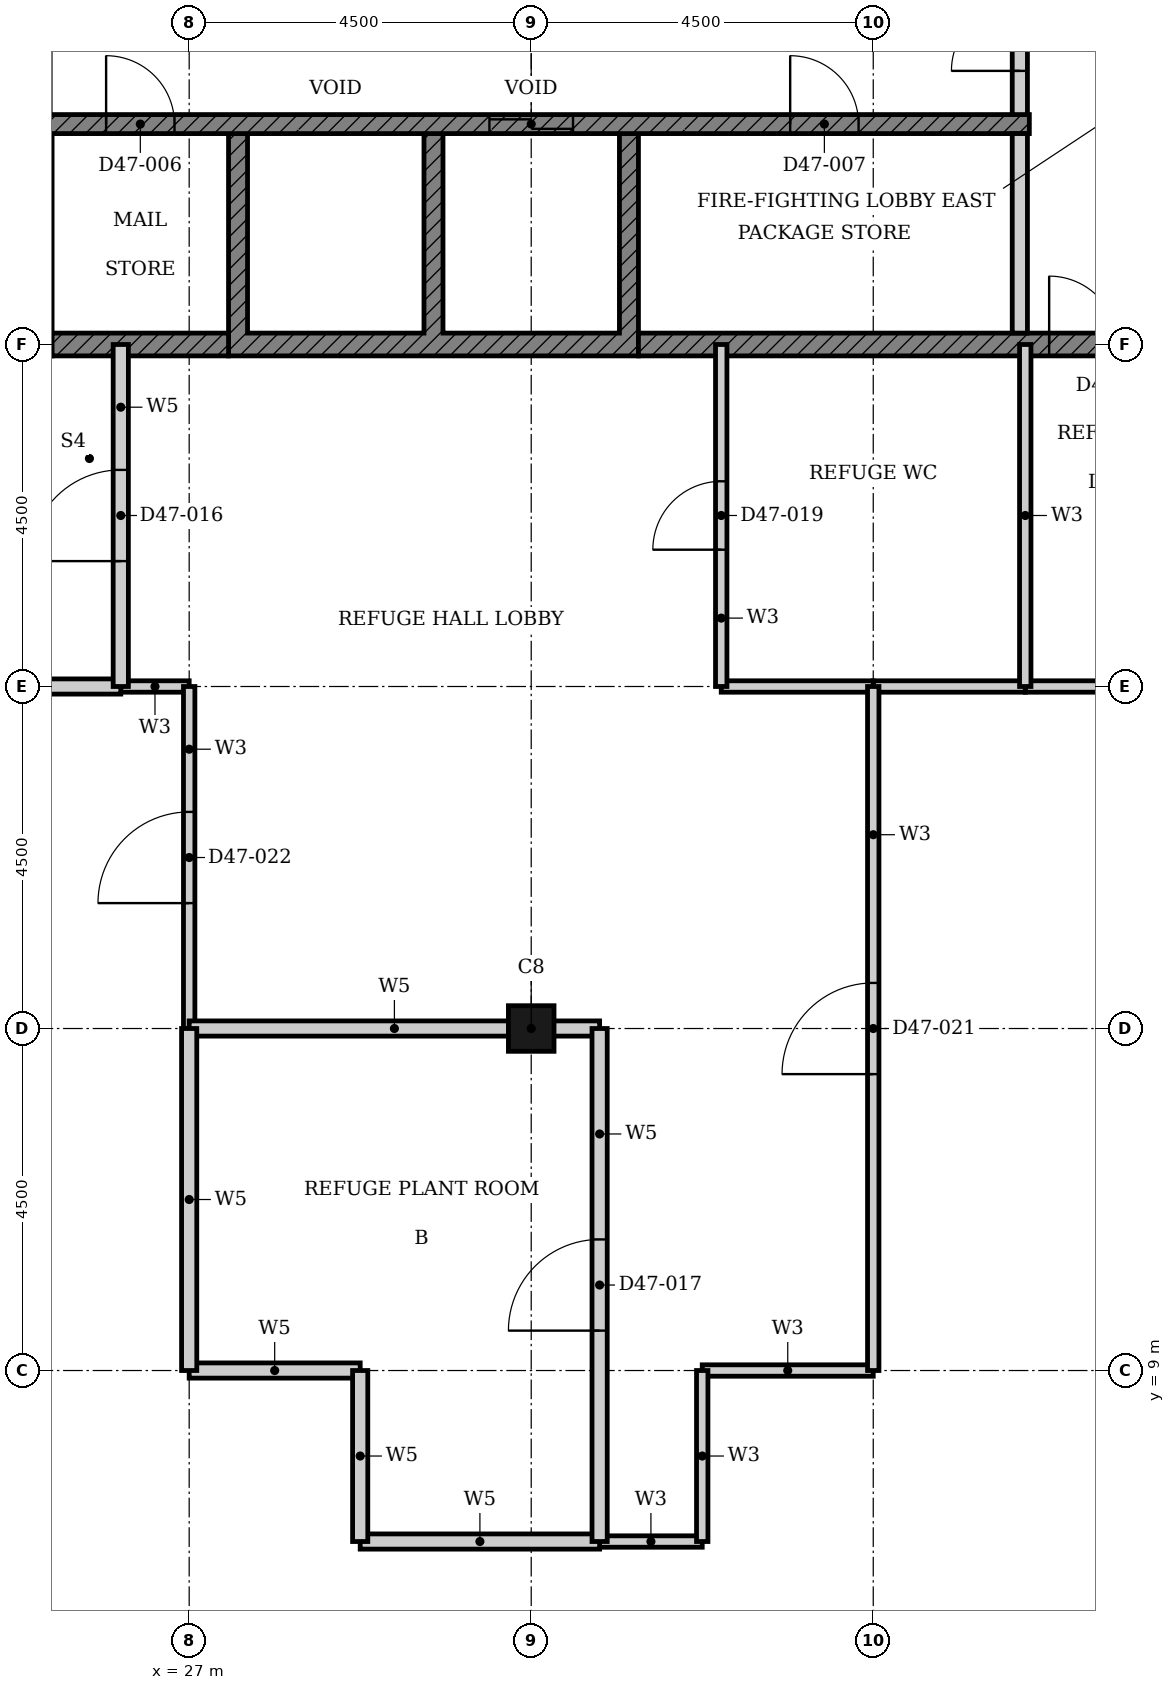
"""IFC4 building model, lengths in metres.
Left out: names, types, materials, properties, quantities, classifications, styles, units other than length and angle.
Written with IfcOpenShell. Run it as: python <this file> out.ifc"""

import sys

from ifc_helpers import new_model, si_unit, direction, frame, frame_2d, origin, origin_2d, place, context, subcontext, project, spatial, polyline, rectangle, hollow_rectangle, outline, extrude, element, fill, save


model = new_model("IFC4")
c1 = context("Model", 3, precision=1e-05, world=origin(), true_north=direction((0.0, 1.0)))
c2 = subcontext(c1, "Body", "Model", "MODEL_VIEW")
j1 = project(units=[si_unit("LENGTHUNIT", "METRE"), si_unit("PLANEANGLEUNIT", "RADIAN")], contexts=[c1])
p1 = place(None, origin())
s1 = spatial("IfcSite", under=j1, at=p1, CompositionType="ELEMENT")
p2 = place(p1, origin())
s2 = spatial("IfcBuilding", under=s1, at=p2, CompositionType="ELEMENT")
p3 = place(p2, frame((0.0, 0.0, 187.6)))
s3 = spatial("IfcBuildingStorey", under=s2, at=p3, CompositionType="ELEMENT", Elevation=187.6)
p4 = place(p3, frame((31.5, 13.5, 0.0), z_axis=(0.0, 0.0, 1.0), x_axis=(1.0, 0.0, 0.0)))
e1 = element("IfcColumn", 1, at=p4, inside=s3, PredefinedType="COLUMN", context=c2, shape_type="SweptSolid", body=[
    extrude(hollow_rectangle(XDim=0.6, YDim=0.6, WallThickness=0.02, at=origin_2d()), origin(), (0.0, 0.0, 1.0), 4.8),
])
p5 = place(p3, origin())
e2 = element("IfcWall", 2, at=p5, inside=s3, PredefinedType="SHEAR", context=c2, shape_type="SweptSolid", body=[
    extrude(outline(polyline([(27.518, 22.35), (32.911, 22.35), (32.911, 25.275), (32.661, 25.275), (32.661, 22.65), (30.339, 22.65), (30.339, 25.275), (30.089, 25.275), (30.089, 22.65), (27.768, 22.65), (27.768, 25.275), (27.518, 25.275), (27.518, 22.35)])), origin(), (0.0, 0.0, 1.0), 4.5),
])
p6 = place(p3, frame((25.197, 22.5, 0.0), z_axis=(0.0, 0.0, 1.0), x_axis=(1.0, 0.0, 0.0)))
e3 = element("IfcWall", 3, at=p6, inside=s3, PredefinedType="SHEAR", context=c2, shape_type="SweptSolid", body=[
    extrude(rectangle(XDim=2.321, YDim=0.3, at=frame_2d((1.161, 0.0))), origin(), (0.0, 0.0, 1.0), 4.5),
])
p7 = place(p3, frame((32.911, 22.5, 0.0), z_axis=(0.0, 0.0, 1.0), x_axis=(1.0, 0.0, 0.0)))
e4 = element("IfcWall", 4, at=p7, inside=s3, PredefinedType="SHEAR", context=c2, shape_type="SweptSolid", body=[
    extrude(rectangle(XDim=11.939, YDim=0.3, at=frame_2d((5.97, 0.0))), origin(), (0.0, 0.0, 1.0), 4.5),
])
p8 = place(p7, frame((5.404, 0.0, 0.0)))
e5 = element("IfcOpeningElement", 5, at=p8, cuts=e4, PredefinedType="OPENING", context=c2, shape_type="SweptSolid", body=[
    extrude(rectangle(XDim=1.8, YDim=2.1, at=frame_2d((0.9, 1.05))), frame((0.0, 0.16, 0.0), z_axis=(0.0, -1.0, 0.0), x_axis=(1.0, 0.0, 0.0)), (0.0, 0.0, 1.0), 0.32),
])
p9 = place(p3, frame((22.375, 25.4, 0.0), z_axis=(0.0, 0.0, 1.0), x_axis=(1.0, 0.0, 0.0)))
e6 = element("IfcWall", 6, at=p9, inside=s3, PredefinedType="SHEAR", context=c2, shape_type="SweptSolid", body=[
    extrude(rectangle(XDim=15.678, YDim=0.25, at=frame_2d((7.839, 0.0))), origin(), (0.0, 0.0, 1.0), 4.5),
])
p10 = place(p9, frame((8.575, 0.0, 0.0)))
e7 = element("IfcOpeningElement", 7, at=p10, cuts=e6, PredefinedType="OPENING", context=c2, shape_type="SweptSolid", body=[
    extrude(rectangle(XDim=1.1, YDim=2.1, at=frame_2d((0.55, 1.05))), frame((0.0, 0.135, 0.0), z_axis=(0.0, -1.0, 0.0), x_axis=(1.0, 0.0, 0.0)), (0.0, 0.0, 1.0), 0.27),
])
p11 = place(p9, frame((0.861, 0.0, 0.0)))
e8 = element("IfcOpeningElement", 8, at=p11, cuts=e6, PredefinedType="OPENING", context=c2, shape_type="SweptSolid", body=[
    extrude(rectangle(XDim=1.1, YDim=2.1, at=frame_2d((0.55, 1.05))), frame((0.0, 0.135, 0.0), z_axis=(0.0, -1.0, 0.0), x_axis=(1.0, 0.0, 0.0)), (0.0, 0.0, 1.0), 0.27),
])
p12 = place(p9, frame((3.532, 0.0, 0.0)))
e9 = element("IfcOpeningElement", 9, at=p12, cuts=e6, PredefinedType="OPENING", context=c2, shape_type="SweptSolid", body=[
    extrude(rectangle(XDim=0.9, YDim=2.1, at=frame_2d((0.45, 1.05))), frame((0.0, 0.135, 0.0), z_axis=(0.0, -1.0, 0.0), x_axis=(1.0, 0.0, 0.0)), (0.0, 0.0, 1.0), 0.27),
])
p13 = place(p9, frame((12.532, 0.0, 0.0)))
e10 = element("IfcOpeningElement", 10, at=p13, cuts=e6, PredefinedType="OPENING", context=c2, shape_type="SweptSolid", body=[
    extrude(rectangle(XDim=0.9, YDim=2.1, at=frame_2d((0.45, 1.05))), frame((0.0, 0.135, 0.0), z_axis=(0.0, -1.0, 0.0), x_axis=(1.0, 0.0, 0.0)), (0.0, 0.0, 1.0), 0.27),
])
p14 = place(p3, frame((37.928, 22.65, 0.0), z_axis=(0.0, 0.0, 1.0), x_axis=(0.0, 1.0, 0.0)))
e11 = element("IfcWall", 11, at=p14, inside=s3, PredefinedType="PARTITIONING", context=c2, shape_type="SweptSolid", body=[
    extrude(rectangle(XDim=2.625, YDim=0.2, at=frame_2d((1.312, 0.0))), origin(), (0.0, 0.0, 1.0), 4.5),
])
p15 = place(p3, frame((37.928, 25.525, 0.0), z_axis=(0.0, 0.0, 1.0), x_axis=(0.0, 1.0, 0.0)))
e12 = element("IfcWall", 12, at=p15, inside=s3, PredefinedType="PARTITIONING", context=c2, shape_type="SweptSolid", body=[
    extrude(rectangle(XDim=2.95, YDim=0.2, at=frame_2d((1.475, 0.0))), origin(), (0.0, 0.0, 1.0), 4.5),
])
p16 = place(p15, frame((0.575, 0.0, 0.0)))
e13 = element("IfcOpeningElement", 13, at=p16, cuts=e12, PredefinedType="OPENING", context=c2, shape_type="SweptSolid", body=[
    extrude(rectangle(XDim=1.8, YDim=2.1, at=frame_2d((0.9, 1.05))), frame((0.0, 0.11, 0.0), z_axis=(0.0, -1.0, 0.0), x_axis=(1.0, 0.0, 0.0)), (0.0, 0.0, 1.0), 0.22),
])
p17 = place(p3, frame((26.1, 18.0, 0.0), z_axis=(0.0, 0.0, 1.0), x_axis=(1.0, 0.0, 0.0)))
e14 = element("IfcWall", 14, at=p17, inside=s3, PredefinedType="PARTITIONING", context=c2, shape_type="SweptSolid", body=[
    extrude(rectangle(XDim=0.9, YDim=0.15, at=frame_2d((0.45, 0.0))), origin(), (0.0, 0.0, 1.0), 4.5),
])
p18 = place(p3, frame((38.0, 18.0, 0.0), z_axis=(0.0, 0.0, 1.0), x_axis=(1.0, 0.0, 0.0)))
e15 = element("IfcWall", 15, at=p18, inside=s3, PredefinedType="PARTITIONING", context=c2, shape_type="SweptSolid", body=[
    extrude(rectangle(XDim=2.5, YDim=0.15, at=frame_2d((1.25, 0.0))), origin(), (0.0, 0.0, 1.0), 4.5),
])
for number, where, z_axis, x_axis in (
    (16, (36.0, 18.0, 0.0), (0.0, 0.0, 1.0), (1.0, 0.0, 0.0)),
    (17, (34.0, 18.0, 0.0), (0.0, 0.0, 1.0), (1.0, 0.0, 0.0)),
):
    element("IfcWall", number, at=place(p3, frame(where, z_axis=z_axis, x_axis=x_axis)), inside=s3, PredefinedType="PARTITIONING", context=c2, shape_type="SweptSolid", body=[
        extrude(rectangle(XDim=2.0, YDim=0.15, at=frame_2d((1.0, 0.0))), origin(), (0.0, 0.0, 1.0), 4.5),
    ])
p19 = place(p3, frame((32.4, 6.75, 0.0), z_axis=(0.0, 0.0, 1.0), x_axis=(1.0, 0.0, 0.0)))
e18 = element("IfcWall", 18, at=p19, inside=s3, PredefinedType="PARTITIONING", context=c2, shape_type="SweptSolid", body=[
    extrude(rectangle(XDim=1.35, YDim=0.15, at=frame_2d((0.675, 0.0))), origin(), (0.0, 0.0, 1.0), 4.5),
])
p20 = place(p3, frame((33.75, 9.0, 0.0), z_axis=(0.0, 0.0, 1.0), x_axis=(1.0, 0.0, 0.0)))
e19 = element("IfcWall", 19, at=p20, inside=s3, PredefinedType="PARTITIONING", context=c2, shape_type="SweptSolid", body=[
    extrude(rectangle(XDim=2.25, YDim=0.15, at=frame_2d((1.125, 0.0))), origin(), (0.0, 0.0, 1.0), 4.5),
])
p21 = place(p3, frame((27.0, 13.5, 0.0), z_axis=(0.0, 0.0, 1.0), x_axis=(0.0, 1.0, 0.0)))
e20 = element("IfcWall", 20, at=p21, inside=s3, PredefinedType="PARTITIONING", context=c2, shape_type="SweptSolid", body=[
    extrude(rectangle(XDim=4.5, YDim=0.15, at=frame_2d((2.25, 0.0))), origin(), (0.0, 0.0, 1.0), 4.5),
])
p22 = place(p21, frame((1.65, 0.0, 0.0)))
e21 = element("IfcOpeningElement", 21, at=p22, cuts=e20, PredefinedType="OPENING", context=c2, shape_type="SweptSolid", body=[
    extrude(rectangle(XDim=1.2, YDim=2.1, at=frame_2d((0.6, 1.05))), frame((0.0, 0.085, 0.0), z_axis=(0.0, -1.0, 0.0), x_axis=(1.0, 0.0, 0.0)), (0.0, 0.0, 1.0), 0.17),
])
p23 = place(p3, frame((33.75, 6.75, 0.0), z_axis=(0.0, 0.0, 1.0), x_axis=(0.0, 1.0, 0.0)))
e22 = element("IfcWall", 22, at=p23, inside=s3, PredefinedType="PARTITIONING", context=c2, shape_type="SweptSolid", body=[
    extrude(rectangle(XDim=2.25, YDim=0.15, at=frame_2d((1.125, 0.0))), origin(), (0.0, 0.0, 1.0), 4.5),
])
p24 = place(p3, frame((34.0, 18.0, 0.0), z_axis=(0.0, 0.0, 1.0), x_axis=(0.0, 1.0, 0.0)))
e23 = element("IfcWall", 23, at=p24, inside=s3, PredefinedType="PARTITIONING", context=c2, shape_type="SweptSolid", body=[
    extrude(rectangle(XDim=4.5, YDim=0.15, at=frame_2d((2.25, 0.0))), origin(), (0.0, 0.0, 1.0), 4.5),
])
p25 = place(p24, frame((1.8, 0.0, 0.0)))
e24 = element("IfcOpeningElement", 24, at=p25, cuts=e23, PredefinedType="OPENING", context=c2, shape_type="SweptSolid", body=[
    extrude(rectangle(XDim=0.9, YDim=2.1, at=frame_2d((0.45, 1.05))), frame((0.0, 0.085, 0.0), z_axis=(0.0, -1.0, 0.0), x_axis=(1.0, 0.0, 0.0)), (0.0, 0.0, 1.0), 0.17),
])
p26 = place(p3, frame((36.0, 9.0, 0.0), z_axis=(0.0, 0.0, 1.0), x_axis=(0.0, 1.0, 0.0)))
e25 = element("IfcWall", 25, at=p26, inside=s3, PredefinedType="PARTITIONING", context=c2, shape_type="SweptSolid", body=[
    extrude(rectangle(XDim=9.0, YDim=0.15, at=frame_2d((4.5, 0.0))), origin(), (0.0, 0.0, 1.0), 3.78),
])
p27 = place(p26, frame((3.9, 0.0, 0.0)))
e26 = element("IfcOpeningElement", 26, at=p27, cuts=e25, PredefinedType="OPENING", context=c2, shape_type="SweptSolid", body=[
    extrude(rectangle(XDim=1.2, YDim=2.1, at=frame_2d((0.6, 1.05))), frame((0.0, 0.085, 0.0), z_axis=(0.0, -1.0, 0.0), x_axis=(1.0, 0.0, 0.0)), (0.0, 0.0, 1.0), 0.17),
])
p28 = place(p3, frame((38.0, 18.0, 0.0), z_axis=(0.0, 0.0, 1.0), x_axis=(0.0, 1.0, 0.0)))
e27 = element("IfcWall", 27, at=p28, inside=s3, PredefinedType="PARTITIONING", context=c2, shape_type="SweptSolid", body=[
    extrude(rectangle(XDim=4.5, YDim=0.15, at=frame_2d((2.25, 0.0))), origin(), (0.0, 0.0, 1.0), 4.5),
])
p29 = place(p3, frame((27.0, 13.5, 0.0), z_axis=(0.0, 0.0, 1.0), x_axis=(1.0, 0.0, 0.0)))
e28 = element("IfcWall", 28, at=p29, inside=s3, PredefinedType="PARTITIONING", context=c2, shape_type="SweptSolid", body=[
    extrude(rectangle(XDim=5.4, YDim=0.2, at=frame_2d((2.7, 0.0))), origin(), (0.0, 0.0, 1.0), 3.58),
])
p30 = place(p3, frame((22.5, 18.0, 0.0), z_axis=(0.0, 0.0, 1.0), x_axis=(1.0, 0.0, 0.0)))
e29 = element("IfcWall", 29, at=p30, inside=s3, PredefinedType="PARTITIONING", context=c2, shape_type="SweptSolid", body=[
    extrude(rectangle(XDim=3.6, YDim=0.2, at=frame_2d((1.8, 0.0))), origin(), (0.0, 0.0, 1.0), 4.5),
])
p31 = place(p3, frame((29.25, 6.75, 0.0), z_axis=(0.0, 0.0, 1.0), x_axis=(1.0, 0.0, 0.0)))
e30 = element("IfcWall", 30, at=p31, inside=s3, PredefinedType="PARTITIONING", context=c2, shape_type="SweptSolid", body=[
    extrude(rectangle(XDim=3.15, YDim=0.2, at=frame_2d((1.575, 0.0))), origin(), (0.0, 0.0, 1.0), 4.5),
])
p32 = place(p3, frame((27.0, 9.0, 0.0), z_axis=(0.0, 0.0, 1.0), x_axis=(1.0, 0.0, 0.0)))
e31 = element("IfcWall", 31, at=p32, inside=s3, PredefinedType="PARTITIONING", context=c2, shape_type="SweptSolid", body=[
    extrude(rectangle(XDim=2.25, YDim=0.2, at=frame_2d((1.125, 0.0))), origin(), (0.0, 0.0, 1.0), 4.5),
])
p33 = place(p3, frame((26.1, 18.0, 0.0), z_axis=(0.0, 0.0, 1.0), x_axis=(0.0, 1.0, 0.0)))
e32 = element("IfcWall", 32, at=p33, inside=s3, PredefinedType="PARTITIONING", context=c2, shape_type="SweptSolid", body=[
    extrude(rectangle(XDim=4.5, YDim=0.2, at=frame_2d((2.25, 0.0))), origin(), (0.0, 0.0, 1.0), 4.5),
])
p34 = place(p33, frame((1.65, 0.0, 0.0)))
e33 = element("IfcOpeningElement", 33, at=p34, cuts=e32, PredefinedType="OPENING", context=c2, shape_type="SweptSolid", body=[
    extrude(rectangle(XDim=1.2, YDim=2.1, at=frame_2d((0.6, 1.05))), frame((0.0, 0.11, 0.0), z_axis=(0.0, -1.0, 0.0), x_axis=(1.0, 0.0, 0.0)), (0.0, 0.0, 1.0), 0.22),
])
p35 = place(p3, frame((27.0, 9.0, 0.0), z_axis=(0.0, 0.0, 1.0), x_axis=(0.0, 1.0, 0.0)))
e34 = element("IfcWall", 34, at=p35, inside=s3, PredefinedType="PARTITIONING", context=c2, shape_type="SweptSolid", body=[
    extrude(rectangle(XDim=4.5, YDim=0.2, at=frame_2d((2.25, 0.0))), origin(), (0.0, 0.0, 1.0), 3.78),
])
p36 = place(p3, frame((29.25, 6.75, 0.0), z_axis=(0.0, 0.0, 1.0), x_axis=(0.0, 1.0, 0.0)))
e35 = element("IfcWall", 35, at=p36, inside=s3, PredefinedType="PARTITIONING", context=c2, shape_type="SweptSolid", body=[
    extrude(rectangle(XDim=2.25, YDim=0.2, at=frame_2d((1.125, 0.0))), origin(), (0.0, 0.0, 1.0), 4.5),
])
p37 = place(p3, frame((32.4, 6.75, 0.0), z_axis=(0.0, 0.0, 1.0), x_axis=(0.0, 1.0, 0.0)))
e36 = element("IfcWall", 36, at=p37, inside=s3, PredefinedType="PARTITIONING", context=c2, shape_type="SweptSolid", body=[
    extrude(rectangle(XDim=6.75, YDim=0.2, at=frame_2d((3.375, 0.0))), origin(), (0.0, 0.0, 1.0), 4.5),
])
p38 = place(p37, frame((2.775, 0.0, 0.0)))
e37 = element("IfcOpeningElement", 37, at=p38, cuts=e36, PredefinedType="OPENING", context=c2, shape_type="SweptSolid", body=[
    extrude(rectangle(XDim=1.2, YDim=2.1, at=frame_2d((0.6, 1.05))), frame((0.0, 0.11, 0.0), z_axis=(0.0, -1.0, 0.0), x_axis=(1.0, 0.0, 0.0)), (0.0, 0.0, 1.0), 0.22),
])
p39 = place(p10, origin())
e38 = element("IfcDoor", 38, at=p39, inside=s3, OperationType="DOUBLE_DOOR_SLIDING", PredefinedType="DOOR", context=c2, shape_type="SweptSolid", body=[
    extrude(rectangle(XDim=1.1, YDim=2.1, at=frame_2d((0.55, 1.05))), frame((0.0, 0.025, 0.0), z_axis=(0.0, -1.0, 0.0), x_axis=(1.0, 0.0, 0.0)), (0.0, 0.0, 1.0), 0.05),
])
fill(e7, e38)
p40 = place(p12, origin())
e39 = element("IfcDoor", 39, at=p40, inside=s3, OperationType="SINGLE_SWING_LEFT", PredefinedType="DOOR", context=c2, shape_type="SweptSolid", body=[
    extrude(rectangle(XDim=0.9, YDim=2.1, at=frame_2d((0.45, 1.05))), frame((0.0, 0.025, 0.0), z_axis=(0.0, -1.0, 0.0), x_axis=(1.0, 0.0, 0.0)), (0.0, 0.0, 1.0), 0.05),
])
fill(e9, e39)
p41 = place(p13, origin())
e40 = element("IfcDoor", 40, at=p41, inside=s3, OperationType="SINGLE_SWING_LEFT", PredefinedType="DOOR", context=c2, shape_type="SweptSolid", body=[
    extrude(rectangle(XDim=0.9, YDim=2.1, at=frame_2d((0.45, 1.05))), frame((0.0, 0.025, 0.0), z_axis=(0.0, -1.0, 0.0), x_axis=(1.0, 0.0, 0.0)), (0.0, 0.0, 1.0), 0.05),
])
fill(e10, e40)
p42 = place(p16, origin())
e41 = element("IfcDoor", 41, at=p42, inside=s3, OperationType="DOUBLE_DOOR_SINGLE_SWING", PredefinedType="DOOR", context=c2, shape_type="SweptSolid", body=[
    extrude(rectangle(XDim=1.8, YDim=2.1, at=frame_2d((0.9, 1.05))), frame((0.0, 0.025, 0.0), z_axis=(0.0, -1.0, 0.0), x_axis=(1.0, 0.0, 0.0)), (0.0, 0.0, 1.0), 0.05),
])
fill(e13, e41)
p43 = place(p8, origin())
e42 = element("IfcDoor", 42, at=p43, inside=s3, OperationType="DOUBLE_DOOR_SINGLE_SWING", PredefinedType="DOOR", context=c2, shape_type="SweptSolid", body=[
    extrude(rectangle(XDim=1.8, YDim=2.1, at=frame_2d((0.9, 1.05))), frame((0.0, 0.025, 0.0), z_axis=(0.0, -1.0, 0.0), x_axis=(1.0, 0.0, 0.0)), (0.0, 0.0, 1.0), 0.05),
])
fill(e5, e42)
p44 = place(p34, origin())
e43 = element("IfcDoor", 43, at=p44, inside=s3, OperationType="SINGLE_SWING_RIGHT", PredefinedType="DOOR", context=c2, shape_type="SweptSolid", body=[
    extrude(rectangle(XDim=1.2, YDim=2.1, at=frame_2d((0.6, 1.05))), frame((0.0, 0.025, 0.0), z_axis=(0.0, -1.0, 0.0), x_axis=(1.0, 0.0, 0.0)), (0.0, 0.0, 1.0), 0.05),
])
fill(e33, e43)
p45 = place(p38, origin())
e44 = element("IfcDoor", 44, at=p45, inside=s3, OperationType="SINGLE_SWING_LEFT", PredefinedType="DOOR", context=c2, shape_type="SweptSolid", body=[
    extrude(rectangle(XDim=1.2, YDim=2.1, at=frame_2d((0.6, 1.05))), frame((0.0, 0.025, 0.0), z_axis=(0.0, -1.0, 0.0), x_axis=(1.0, 0.0, 0.0)), (0.0, 0.0, 1.0), 0.05),
])
fill(e37, e44)
p46 = place(p25, origin())
e45 = element("IfcDoor", 45, at=p46, inside=s3, OperationType="SINGLE_SWING_LEFT", PredefinedType="DOOR", context=c2, shape_type="SweptSolid", body=[
    extrude(rectangle(XDim=0.9, YDim=2.1, at=frame_2d((0.45, 1.05))), frame((0.0, 0.025, 0.0), z_axis=(0.0, -1.0, 0.0), x_axis=(1.0, 0.0, 0.0)), (0.0, 0.0, 1.0), 0.05),
])
fill(e24, e45)
p47 = place(p27, origin())
e46 = element("IfcDoor", 46, at=p47, inside=s3, OperationType="SINGLE_SWING_LEFT", PredefinedType="DOOR", context=c2, shape_type="SweptSolid", body=[
    extrude(rectangle(XDim=1.2, YDim=2.1, at=frame_2d((0.6, 1.05))), frame((0.0, 0.025, 0.0), z_axis=(0.0, -1.0, 0.0), x_axis=(1.0, 0.0, 0.0)), (0.0, 0.0, 1.0), 0.05),
])
fill(e26, e46)
p48 = place(p22, origin())
e47 = element("IfcDoor", 47, at=p48, inside=s3, OperationType="SINGLE_SWING_RIGHT", PredefinedType="DOOR", context=c2, shape_type="SweptSolid", body=[
    extrude(rectangle(XDim=1.2, YDim=2.1, at=frame_2d((0.6, 1.05))), frame((0.0, 0.025, 0.0), z_axis=(0.0, -1.0, 0.0), x_axis=(1.0, 0.0, 0.0)), (0.0, 0.0, 1.0), 0.05),
])
fill(e21, e47)
save(model, sys.argv[1])
